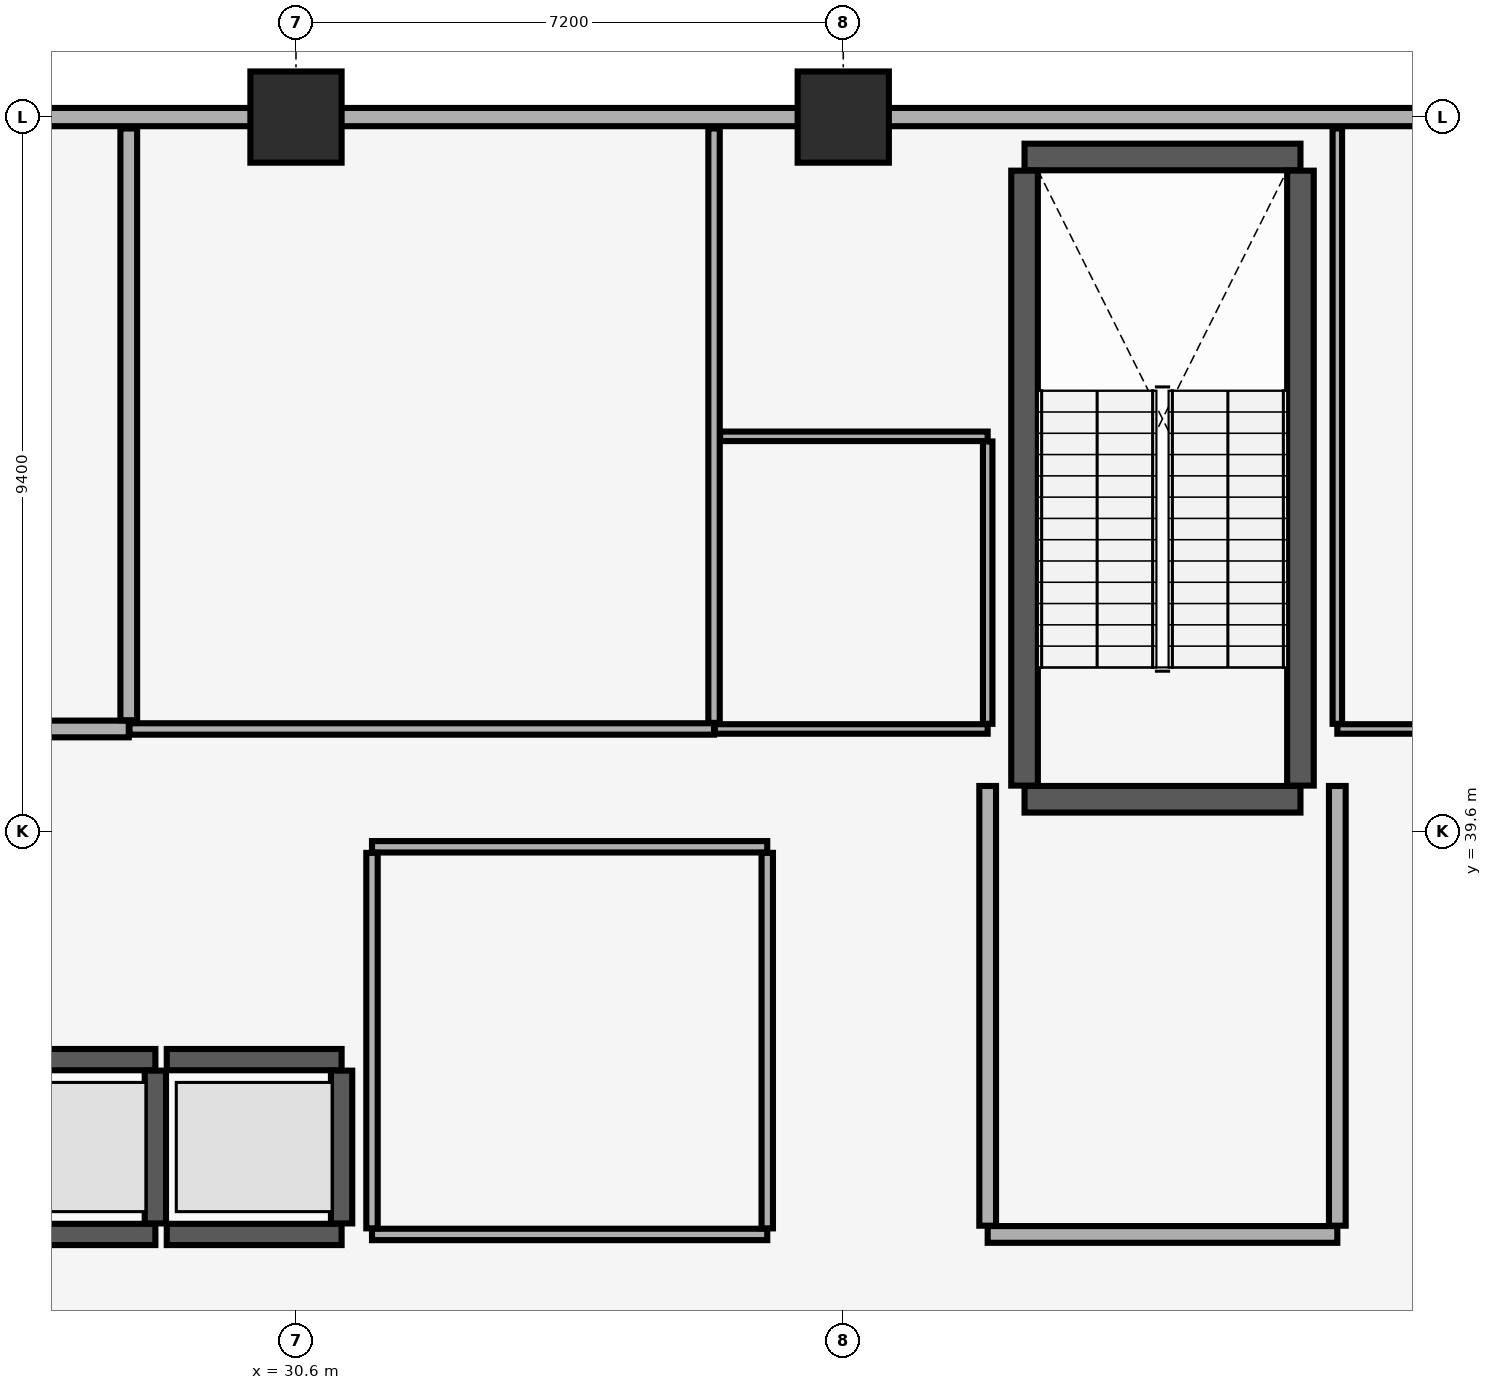
"""IFC4 building model, lengths in metres.
Left out: names, types, materials, properties, quantities, classifications, styles, units other than length and angle.
Written with IfcOpenShell. Run it as: python <this file> out.ifc"""

import sys

from ifc_helpers import new_model, si_unit, direction, frame, frame_2d, origin, origin_2d, place, context, subcontext, project, spatial, rectangle, extrude, element, fill, save


model = new_model("IFC4")
c1 = context("Model", 3, precision=1e-05, world=origin(), true_north=direction((0.0, 1.0)))
c2 = subcontext(c1, "Body", "Model", "MODEL_VIEW")
j1 = project(units=[si_unit("LENGTHUNIT", "METRE"), si_unit("PLANEANGLEUNIT", "RADIAN")], contexts=[c1])
p1 = place(None, origin())
s1 = spatial("IfcSite", under=j1, at=p1, CompositionType="ELEMENT")
p2 = place(p1, origin())
s2 = spatial("IfcBuilding", under=s1, at=p2, CompositionType="ELEMENT")
p3 = place(p2, frame((0.0, 0.0, 224.35)))
s3 = spatial("IfcBuildingStorey", under=s2, at=p3, CompositionType="ELEMENT", Elevation=224.35)
for number, where, z_axis, x_axis in (
    (1, (30.6, 49.0, 0.0), (0.0, 0.0, 1.0), (1.0, 0.0, 0.0)),
    (2, (37.8, 49.0, 0.0), (0.0, 0.0, 1.0), (1.0, 0.0, 0.0)),
):
    element("IfcColumn", number, at=place(p3, frame(where, z_axis=z_axis, x_axis=x_axis)), inside=s3, PredefinedType="COLUMN", context=c2, shape_type="SweptSolid", body=[
        extrude(rectangle(XDim=1.2, YDim=1.2, at=origin_2d()), origin(), (0.0, 0.0, 1.0), 4.56),
    ])
p4 = place(p3, frame((77.0, 49.0, 0.0), z_axis=(0.0, 0.0, 1.0), x_axis=(-1.0, 0.0, 0.0)))
e3 = element("IfcWall", 3, at=p4, inside=s3, PredefinedType="SOLIDWALL", context=c2, shape_type="SweptSolid", body=[
    extrude(rectangle(XDim=70.0, YDim=0.24, at=frame_2d((35.0, 0.0))), origin(), (0.0, 0.0, 1.0), 3.4),
])
p5 = place(p4, frame((62.975, 0.0, 0.85)))
e4 = element("IfcOpeningElement", 4, at=p5, cuts=e3, PredefinedType="OPENING", context=c2, shape_type="SweptSolid", body=[
    extrude(rectangle(XDim=3.0, YDim=1.5, at=frame_2d((1.5, 0.75))), frame((0.0, 0.13, 0.0), z_axis=(0.0, -1.0, 0.0), x_axis=(1.0, 0.0, 0.0)), (0.0, 0.0, 1.0), 0.26),
])
p6 = place(p4, frame((4.025, 0.0, 0.85)))
e5 = element("IfcOpeningElement", 5, at=p6, cuts=e3, PredefinedType="OPENING", context=c2, shape_type="SweptSolid", body=[
    extrude(rectangle(XDim=3.0, YDim=1.5, at=frame_2d((1.5, 0.75))), frame((0.0, 0.13, 0.0), z_axis=(0.0, -1.0, 0.0), x_axis=(1.0, 0.0, 0.0)), (0.0, 0.0, 1.0), 0.26),
])
p7 = place(p4, frame((49.465, 0.0, 0.9)))
e6 = element("IfcOpeningElement", 6, at=p7, cuts=e3, PredefinedType="OPENING", context=c2, shape_type="SweptSolid", body=[
    extrude(rectangle(XDim=1.5, YDim=1.4, at=frame_2d((0.75, 0.7))), frame((0.0, 0.13, 0.0), z_axis=(0.0, -1.0, 0.0), x_axis=(1.0, 0.0, 0.0)), (0.0, 0.0, 1.0), 0.26),
])
p8 = place(p4, frame((41.65, 0.0, 0.9)))
e7 = element("IfcOpeningElement", 7, at=p8, cuts=e3, PredefinedType="OPENING", context=c2, shape_type="SweptSolid", body=[
    extrude(rectangle(XDim=3.6, YDim=1.5, at=frame_2d((1.8, 0.75))), frame((0.0, 0.13, 0.0), z_axis=(0.0, -1.0, 0.0), x_axis=(1.0, 0.0, 0.0)), (0.0, 0.0, 1.0), 0.26),
])
p9 = place(p4, frame((28.25, 0.0, 0.9)))
e8 = element("IfcOpeningElement", 8, at=p9, cuts=e3, PredefinedType="OPENING", context=c2, shape_type="SweptSolid", body=[
    extrude(rectangle(XDim=1.5, YDim=1.4, at=frame_2d((0.75, 0.7))), frame((0.0, 0.13, 0.0), z_axis=(0.0, -1.0, 0.0), x_axis=(1.0, 0.0, 0.0)), (0.0, 0.0, 1.0), 0.26),
])
p10 = place(p4, frame((24.6, 0.0, 0.9)))
e9 = element("IfcOpeningElement", 9, at=p10, cuts=e3, PredefinedType="OPENING", context=c2, shape_type="SweptSolid", body=[
    extrude(rectangle(XDim=2.4, YDim=1.5, at=frame_2d((1.2, 0.75))), frame((0.0, 0.13, 0.0), z_axis=(0.0, -1.0, 0.0), x_axis=(1.0, 0.0, 0.0)), (0.0, 0.0, 1.0), 0.26),
])
p11 = place(p4, frame((20.235, 0.0, 0.9)))
e10 = element("IfcOpeningElement", 10, at=p11, cuts=e3, PredefinedType="OPENING", context=c2, shape_type="SweptSolid", body=[
    extrude(rectangle(XDim=2.4, YDim=1.5, at=frame_2d((1.2, 0.75))), frame((0.0, 0.13, 0.0), z_axis=(0.0, -1.0, 0.0), x_axis=(1.0, 0.0, 0.0)), (0.0, 0.0, 1.0), 0.26),
])
p12 = place(p3, frame((40.185, 40.025, 0.0), z_axis=(0.0, 0.0, 1.0), x_axis=(1.0, 0.0, 0.0)))
e11 = element("IfcWall", 11, at=p12, inside=s3, PredefinedType="SHEAR", context=c2, shape_type="SweptSolid", body=[
    extrude(rectangle(XDim=3.63, YDim=0.35, at=frame_2d((1.815, 0.0))), origin(), (0.0, 0.0, 1.0), 4.52),
])
p13 = place(p12, frame((1.24, 0.0, 0.0)))
e12 = element("IfcOpeningElement", 12, at=p13, cuts=e11, PredefinedType="OPENING", context=c2, shape_type="SweptSolid", body=[
    extrude(rectangle(XDim=1.15, YDim=2.15, at=frame_2d((0.575, 1.075))), frame((0.0, 0.185, 0.0), z_axis=(0.0, -1.0, 0.0), x_axis=(1.0, 0.0, 0.0)), (0.0, 0.0, 1.0), 0.37),
])
p14 = place(p3, frame((40.185, 48.475, 0.0), z_axis=(0.0, 0.0, 1.0), x_axis=(1.0, 0.0, 0.0)))
e13 = element("IfcWall", 13, at=p14, inside=s3, PredefinedType="SHEAR", context=c2, shape_type="SweptSolid", body=[
    extrude(rectangle(XDim=3.63, YDim=0.35, at=frame_2d((1.815, 0.0))), origin(), (0.0, 0.0, 1.0), 4.52),
])
for number, where, z_axis, x_axis in (
    (14, (40.185, 40.205, 0.0), (0.0, 0.0, 1.0), (0.0, 1.0, 0.0)),
    (15, (43.815, 40.205, 0.0), (0.0, 0.0, 1.0), (0.0, 1.0, 0.0)),
):
    element("IfcWall", number, at=place(p3, frame(where, z_axis=z_axis, x_axis=x_axis)), inside=s3, PredefinedType="SHEAR", context=c2, shape_type="SweptSolid", body=[
        extrude(rectangle(XDim=8.09, YDim=0.35, at=frame_2d((4.045, 0.0))), origin(), (0.0, 0.0, 1.0), 4.52),
    ])
p15 = place(p3, frame((26.45, 34.3, 0.0), z_axis=(0.0, 0.0, 1.0), x_axis=(1.0, 0.0, 0.0)))
e16 = element("IfcWall", 16, at=p15, inside=s3, PredefinedType="SHEAR", context=c2, shape_type="SweptSolid", body=[
    extrude(rectangle(XDim=2.3, YDim=0.28, at=frame_2d((1.15, 0.0))), origin(), (0.0, 0.0, 1.0), 4.52),
])
p16 = place(p15, frame((0.6, 0.0, 0.0)))
e17 = element("IfcOpeningElement", 17, at=p16, cuts=e16, PredefinedType="OPENING", context=c2, shape_type="SweptSolid", body=[
    extrude(rectangle(XDim=1.1, YDim=2.2, at=frame_2d((0.55, 1.1))), frame((0.0, 0.15, 0.0), z_axis=(0.0, -1.0, 0.0), x_axis=(1.0, 0.0, 0.0)), (0.0, 0.0, 1.0), 0.3),
])
p17 = place(p3, frame((26.45, 36.6, 0.0), z_axis=(0.0, 0.0, 1.0), x_axis=(1.0, 0.0, 0.0)))
e18 = element("IfcWall", 18, at=p17, inside=s3, PredefinedType="SHEAR", context=c2, shape_type="SweptSolid", body=[
    extrude(rectangle(XDim=2.3, YDim=0.28, at=frame_2d((1.15, 0.0))), origin(), (0.0, 0.0, 1.0), 4.52),
])
p18 = place(p3, frame((28.75, 34.445, 0.0), z_axis=(0.0, 0.0, 1.0), x_axis=(0.0, 1.0, 0.0)))
e19 = element("IfcWall", 19, at=p18, inside=s3, PredefinedType="SHEAR", context=c2, shape_type="SweptSolid", body=[
    extrude(rectangle(XDim=2.01, YDim=0.28, at=frame_2d((1.005, 0.0))), origin(), (0.0, 0.0, 1.0), 4.52),
])
p19 = place(p3, frame((28.9, 34.3, 0.0), z_axis=(0.0, 0.0, 1.0), x_axis=(1.0, 0.0, 0.0)))
e20 = element("IfcWall", 20, at=p19, inside=s3, PredefinedType="SHEAR", context=c2, shape_type="SweptSolid", body=[
    extrude(rectangle(XDim=2.3, YDim=0.28, at=frame_2d((1.15, 0.0))), origin(), (0.0, 0.0, 1.0), 4.52),
])
p20 = place(p19, frame((0.6, 0.0, 0.0)))
e21 = element("IfcOpeningElement", 21, at=p20, cuts=e20, PredefinedType="OPENING", context=c2, shape_type="SweptSolid", body=[
    extrude(rectangle(XDim=1.1, YDim=2.2, at=frame_2d((0.55, 1.1))), frame((0.0, 0.15, 0.0), z_axis=(0.0, -1.0, 0.0), x_axis=(1.0, 0.0, 0.0)), (0.0, 0.0, 1.0), 0.3),
])
p21 = place(p3, frame((28.9, 36.6, 0.0), z_axis=(0.0, 0.0, 1.0), x_axis=(1.0, 0.0, 0.0)))
e22 = element("IfcWall", 22, at=p21, inside=s3, PredefinedType="SHEAR", context=c2, shape_type="SweptSolid", body=[
    extrude(rectangle(XDim=2.3, YDim=0.28, at=frame_2d((1.15, 0.0))), origin(), (0.0, 0.0, 1.0), 4.52),
])
p22 = place(p3, frame((31.2, 34.445, 0.0), z_axis=(0.0, 0.0, 1.0), x_axis=(0.0, 1.0, 0.0)))
e23 = element("IfcWall", 23, at=p22, inside=s3, PredefinedType="SHEAR", context=c2, shape_type="SweptSolid", body=[
    extrude(rectangle(XDim=2.01, YDim=0.28, at=frame_2d((1.005, 0.0))), origin(), (0.0, 0.0, 1.0), 4.52),
])
p23 = place(p3, frame((39.7, 34.3, 0.0), z_axis=(0.0, 0.0, 1.0), x_axis=(1.0, 0.0, 0.0)))
e24 = element("IfcWall", 24, at=p23, inside=s3, PredefinedType="PARTITIONING", context=c2, shape_type="SweptSolid", body=[
    extrude(rectangle(XDim=4.6, YDim=0.22, at=frame_2d((2.3, 0.0))), origin(), (0.0, 0.0, 1.0), 4.52),
])
p24 = place(p23, frame((1.7, 0.0, 0.0)))
e25 = element("IfcOpeningElement", 25, at=p24, cuts=e24, PredefinedType="OPENING", context=c2, shape_type="SweptSolid", body=[
    extrude(rectangle(XDim=1.2, YDim=2.15, at=frame_2d((0.6, 1.075))), frame((0.0, 0.12, 0.0), z_axis=(0.0, -1.0, 0.0), x_axis=(1.0, 0.0, 0.0)), (0.0, 0.0, 1.0), 0.24),
])
for number, where, z_axis, x_axis in (
    (26, (39.7, 34.415, 0.0), (0.0, 0.0, 1.0), (0.0, 1.0, 0.0)),
    (27, (44.3, 34.415, 0.0), (0.0, 0.0, 1.0), (0.0, 1.0, 0.0)),
):
    element("IfcWall", number, at=place(p3, frame(where, z_axis=z_axis, x_axis=x_axis)), inside=s3, PredefinedType="PARTITIONING", context=c2, shape_type="SweptSolid", body=[
        extrude(rectangle(XDim=5.785, YDim=0.22, at=frame_2d((2.893, 0.0))), origin(), (0.0, 0.0, 1.0), 4.52),
    ])
p25 = place(p3, frame((31.6, 34.3, 0.0), z_axis=(0.0, 0.0, 1.0), x_axis=(1.0, 0.0, 0.0)))
e28 = element("IfcWall", 28, at=p25, inside=s3, PredefinedType="PARTITIONING", context=c2, shape_type="SweptSolid", body=[
    extrude(rectangle(XDim=5.2, YDim=0.15, at=frame_2d((2.6, 0.0))), origin(), (0.0, 0.0, 1.0), 4.52),
])
p26 = place(p25, frame((2.175, 0.0, 0.0)))
e29 = element("IfcOpeningElement", 29, at=p26, cuts=e28, PredefinedType="OPENING", context=c2, shape_type="SweptSolid", body=[
    extrude(rectangle(XDim=0.85, YDim=2.1, at=frame_2d((0.425, 1.05))), frame((0.0, 0.085, 0.0), z_axis=(0.0, -1.0, 0.0), x_axis=(1.0, 0.0, 0.0)), (0.0, 0.0, 1.0), 0.17),
])
p27 = place(p3, frame((31.6, 39.4, 0.0), z_axis=(0.0, 0.0, 1.0), x_axis=(1.0, 0.0, 0.0)))
e30 = element("IfcWall", 30, at=p27, inside=s3, PredefinedType="PARTITIONING", context=c2, shape_type="SweptSolid", body=[
    extrude(rectangle(XDim=5.2, YDim=0.15, at=frame_2d((2.6, 0.0))), origin(), (0.0, 0.0, 1.0), 4.52),
])
for number, where, z_axis, x_axis in (
    (31, (31.6, 34.38, 0.0), (0.0, 0.0, 1.0), (0.0, 1.0, 0.0)),
    (32, (36.8, 34.38, 0.0), (0.0, 0.0, 1.0), (0.0, 1.0, 0.0)),
):
    element("IfcWall", number, at=place(p3, frame(where, z_axis=z_axis, x_axis=x_axis)), inside=s3, PredefinedType="PARTITIONING", context=c2, shape_type="SweptSolid", body=[
        extrude(rectangle(XDim=4.94, YDim=0.15, at=frame_2d((2.47, 0.0))), origin(), (0.0, 0.0, 1.0), 4.52),
    ])
p28 = place(p3, frame((25.0, 40.95, 0.0), z_axis=(0.0, 0.0, 1.0), x_axis=(1.0, 0.0, 0.0)))
e33 = element("IfcWall", 33, at=p28, inside=s3, PredefinedType="PARTITIONING", context=c2, shape_type="SweptSolid", body=[
    extrude(rectangle(XDim=3.4, YDim=0.22, at=frame_2d((1.7, 0.0))), origin(), (0.0, 0.0, 1.0), 4.52),
])
p29 = place(p28, frame((1.275, 0.0, 0.0)))
e34 = element("IfcOpeningElement", 34, at=p29, cuts=e33, PredefinedType="OPENING", context=c2, shape_type="SweptSolid", body=[
    extrude(rectangle(XDim=0.85, YDim=2.1, at=frame_2d((0.425, 1.05))), frame((0.0, 0.12, 0.0), z_axis=(0.0, -1.0, 0.0), x_axis=(1.0, 0.0, 0.0)), (0.0, 0.0, 1.0), 0.24),
])
p30 = place(p3, frame((28.4, 41.065, 0.0), z_axis=(0.0, 0.0, 1.0), x_axis=(0.0, 1.0, 0.0)))
e35 = element("IfcWall", 35, at=p30, inside=s3, PredefinedType="PARTITIONING", context=c2, shape_type="SweptSolid", body=[
    extrude(rectangle(XDim=7.785, YDim=0.22, at=frame_2d((3.893, 0.0))), origin(), (0.0, 0.0, 1.0), 4.52),
])
p31 = place(p3, frame((28.41, 40.95, 0.0), z_axis=(0.0, 0.0, 1.0), x_axis=(1.0, 0.0, 0.0)))
e36 = element("IfcWall", 36, at=p31, inside=s3, PredefinedType="PARTITIONING", context=c2, shape_type="SweptSolid", body=[
    extrude(rectangle(XDim=7.69, YDim=0.15, at=frame_2d((3.845, 0.0))), origin(), (0.0, 0.0, 1.0), 4.52),
])
p32 = place(p31, frame((3.415, 0.0, 0.0)))
e37 = element("IfcOpeningElement", 37, at=p32, cuts=e36, PredefinedType="OPENING", context=c2, shape_type="SweptSolid", body=[
    extrude(rectangle(XDim=0.85, YDim=2.1, at=frame_2d((0.425, 1.05))), frame((0.0, 0.085, 0.0), z_axis=(0.0, -1.0, 0.0), x_axis=(1.0, 0.0, 0.0)), (0.0, 0.0, 1.0), 0.17),
])
p33 = place(p3, frame((36.1, 41.03, 0.0), z_axis=(0.0, 0.0, 1.0), x_axis=(0.0, 1.0, 0.0)))
e38 = element("IfcWall", 38, at=p33, inside=s3, PredefinedType="PARTITIONING", context=c2, shape_type="SweptSolid", body=[
    extrude(rectangle(XDim=7.82, YDim=0.15, at=frame_2d((3.91, 0.0))), origin(), (0.0, 0.0, 1.0), 4.52),
])
p34 = place(p3, frame((36.11, 40.95, 0.0), z_axis=(0.0, 0.0, 1.0), x_axis=(1.0, 0.0, 0.0)))
e39 = element("IfcWall", 39, at=p34, inside=s3, PredefinedType="PARTITIONING", context=c2, shape_type="SweptSolid", body=[
    extrude(rectangle(XDim=3.59, YDim=0.125, at=frame_2d((1.795, 0.0))), origin(), (0.0, 0.0, 1.0), 4.52),
])
p35 = place(p34, frame((1.34, 0.0, 0.0)))
e40 = element("IfcOpeningElement", 40, at=p35, cuts=e39, PredefinedType="OPENING", context=c2, shape_type="SweptSolid", body=[
    extrude(rectangle(XDim=0.9, YDim=2.1, at=frame_2d((0.45, 1.05))), frame((0.0, 0.073, 0.0), z_axis=(0.0, -1.0, 0.0), x_axis=(1.0, 0.0, 0.0)), (0.0, 0.0, 1.0), 0.145),
])
p36 = place(p3, frame((36.18, 44.8, 0.0), z_axis=(0.0, 0.0, 1.0), x_axis=(1.0, 0.0, 0.0)))
e41 = element("IfcWall", 41, at=p36, inside=s3, PredefinedType="PARTITIONING", context=c2, shape_type="SweptSolid", body=[
    extrude(rectangle(XDim=3.52, YDim=0.125, at=frame_2d((1.76, 0.0))), origin(), (0.0, 0.0, 1.0), 4.52),
])
p37 = place(p3, frame((39.7, 41.018, 0.0), z_axis=(0.0, 0.0, 1.0), x_axis=(0.0, 1.0, 0.0)))
e42 = element("IfcWall", 42, at=p37, inside=s3, PredefinedType="PARTITIONING", context=c2, shape_type="SweptSolid", body=[
    extrude(rectangle(XDim=3.715, YDim=0.125, at=frame_2d((1.857, 0.0))), origin(), (0.0, 0.0, 1.0), 4.52),
])
p38 = place(p3, frame((44.3, 40.95, 0.0), z_axis=(0.0, 0.0, 1.0), x_axis=(1.0, 0.0, 0.0)))
e43 = element("IfcWall", 43, at=p38, inside=s3, PredefinedType="PARTITIONING", context=c2, shape_type="SweptSolid", body=[
    extrude(rectangle(XDim=5.1, YDim=0.125, at=frame_2d((2.55, 0.0))), origin(), (0.0, 0.0, 1.0), 4.52),
])
p39 = place(p38, frame((2.85, 0.0, 0.0)))
e44 = element("IfcOpeningElement", 44, at=p39, cuts=e43, PredefinedType="OPENING", context=c2, shape_type="SweptSolid", body=[
    extrude(rectangle(XDim=0.9, YDim=2.1, at=frame_2d((0.45, 1.05))), frame((0.0, 0.073, 0.0), z_axis=(0.0, -1.0, 0.0), x_axis=(1.0, 0.0, 0.0)), (0.0, 0.0, 1.0), 0.145),
])
p40 = place(p3, frame((44.3, 41.018, 0.0), z_axis=(0.0, 0.0, 1.0), x_axis=(0.0, 1.0, 0.0)))
e45 = element("IfcWall", 45, at=p40, inside=s3, PredefinedType="PARTITIONING", context=c2, shape_type="SweptSolid", body=[
    extrude(rectangle(XDim=7.833, YDim=0.125, at=frame_2d((3.916, 0.0))), origin(), (0.0, 0.0, 1.0), 4.52),
])
p41 = place(p7, origin())
e46 = element("IfcWindow", 46, at=p41, inside=s3, PartitioningType="SINGLE_PANEL", PredefinedType="WINDOW", context=c2, shape_type="SweptSolid", body=[
    extrude(rectangle(XDim=1.5, YDim=1.4, at=frame_2d((0.75, 0.7))), frame((0.0, 0.03, 0.0), z_axis=(0.0, -1.0, 0.0), x_axis=(1.0, 0.0, 0.0)), (0.0, 0.0, 1.0), 0.06),
])
fill(e6, e46)
p42 = place(p8, origin())
e47 = element("IfcWindow", 47, at=p42, inside=s3, PartitioningType="SINGLE_PANEL", PredefinedType="WINDOW", context=c2, shape_type="SweptSolid", body=[
    extrude(rectangle(XDim=3.6, YDim=1.5, at=frame_2d((1.8, 0.75))), frame((0.0, 0.03, 0.0), z_axis=(0.0, -1.0, 0.0), x_axis=(1.0, 0.0, 0.0)), (0.0, 0.0, 1.0), 0.06),
])
fill(e7, e47)
p43 = place(p13, origin())
e48 = element("IfcDoor", 48, at=p43, inside=s3, OperationType="SINGLE_SWING_LEFT", PredefinedType="DOOR", context=c2, shape_type="SweptSolid", body=[
    extrude(rectangle(XDim=1.15, YDim=2.15, at=frame_2d((0.575, 1.075))), frame((0.0, 0.025, 0.0), z_axis=(0.0, -1.0, 0.0), x_axis=(1.0, 0.0, 0.0)), (0.0, 0.0, 1.0), 0.05),
])
fill(e12, e48)
p44 = place(p16, origin())
e49 = element("IfcDoor", 49, at=p44, inside=s3, OperationType="DOUBLE_DOOR_SLIDING", PredefinedType="DOOR", context=c2, shape_type="SweptSolid", body=[
    extrude(rectangle(XDim=1.1, YDim=2.2, at=frame_2d((0.55, 1.1))), frame((0.0, 0.025, 0.0), z_axis=(0.0, -1.0, 0.0), x_axis=(1.0, 0.0, 0.0)), (0.0, 0.0, 1.0), 0.05),
])
fill(e17, e49)
p45 = place(p20, origin())
e50 = element("IfcDoor", 50, at=p45, inside=s3, OperationType="DOUBLE_DOOR_SLIDING", PredefinedType="DOOR", context=c2, shape_type="SweptSolid", body=[
    extrude(rectangle(XDim=1.1, YDim=2.2, at=frame_2d((0.55, 1.1))), frame((0.0, 0.025, 0.0), z_axis=(0.0, -1.0, 0.0), x_axis=(1.0, 0.0, 0.0)), (0.0, 0.0, 1.0), 0.05),
])
fill(e21, e50)
p46 = place(p24, origin())
e51 = element("IfcDoor", 51, at=p46, inside=s3, OperationType="SINGLE_SWING_LEFT", PredefinedType="DOOR", context=c2, shape_type="SweptSolid", body=[
    extrude(rectangle(XDim=1.2, YDim=2.15, at=frame_2d((0.6, 1.075))), frame((0.0, 0.025, 0.0), z_axis=(0.0, -1.0, 0.0), x_axis=(1.0, 0.0, 0.0)), (0.0, 0.0, 1.0), 0.05),
])
fill(e25, e51)
p47 = place(p26, origin())
e52 = element("IfcDoor", 52, at=p47, inside=s3, OperationType="SINGLE_SWING_LEFT", PredefinedType="DOOR", context=c2, shape_type="SweptSolid", body=[
    extrude(rectangle(XDim=0.85, YDim=2.1, at=frame_2d((0.425, 1.05))), frame((0.0, 0.025, 0.0), z_axis=(0.0, -1.0, 0.0), x_axis=(1.0, 0.0, 0.0)), (0.0, 0.0, 1.0), 0.05),
])
fill(e29, e52)
p48 = place(p32, origin())
e53 = element("IfcDoor", 53, at=p48, inside=s3, OperationType="SINGLE_SWING_LEFT", PredefinedType="DOOR", context=c2, shape_type="SweptSolid", body=[
    extrude(rectangle(XDim=0.85, YDim=2.1, at=frame_2d((0.425, 1.05))), frame((0.0, 0.025, 0.0), z_axis=(0.0, -1.0, 0.0), x_axis=(1.0, 0.0, 0.0)), (0.0, 0.0, 1.0), 0.05),
])
fill(e37, e53)
p49 = place(p35, origin())
e54 = element("IfcDoor", 54, at=p49, inside=s3, OperationType="SINGLE_SWING_RIGHT", PredefinedType="DOOR", context=c2, shape_type="SweptSolid", body=[
    extrude(rectangle(XDim=0.9, YDim=2.1, at=frame_2d((0.45, 1.05))), frame((0.0, 0.025, 0.0), z_axis=(0.0, -1.0, 0.0), x_axis=(1.0, 0.0, 0.0)), (0.0, 0.0, 1.0), 0.05),
])
fill(e40, e54)
save(model, sys.argv[1])
